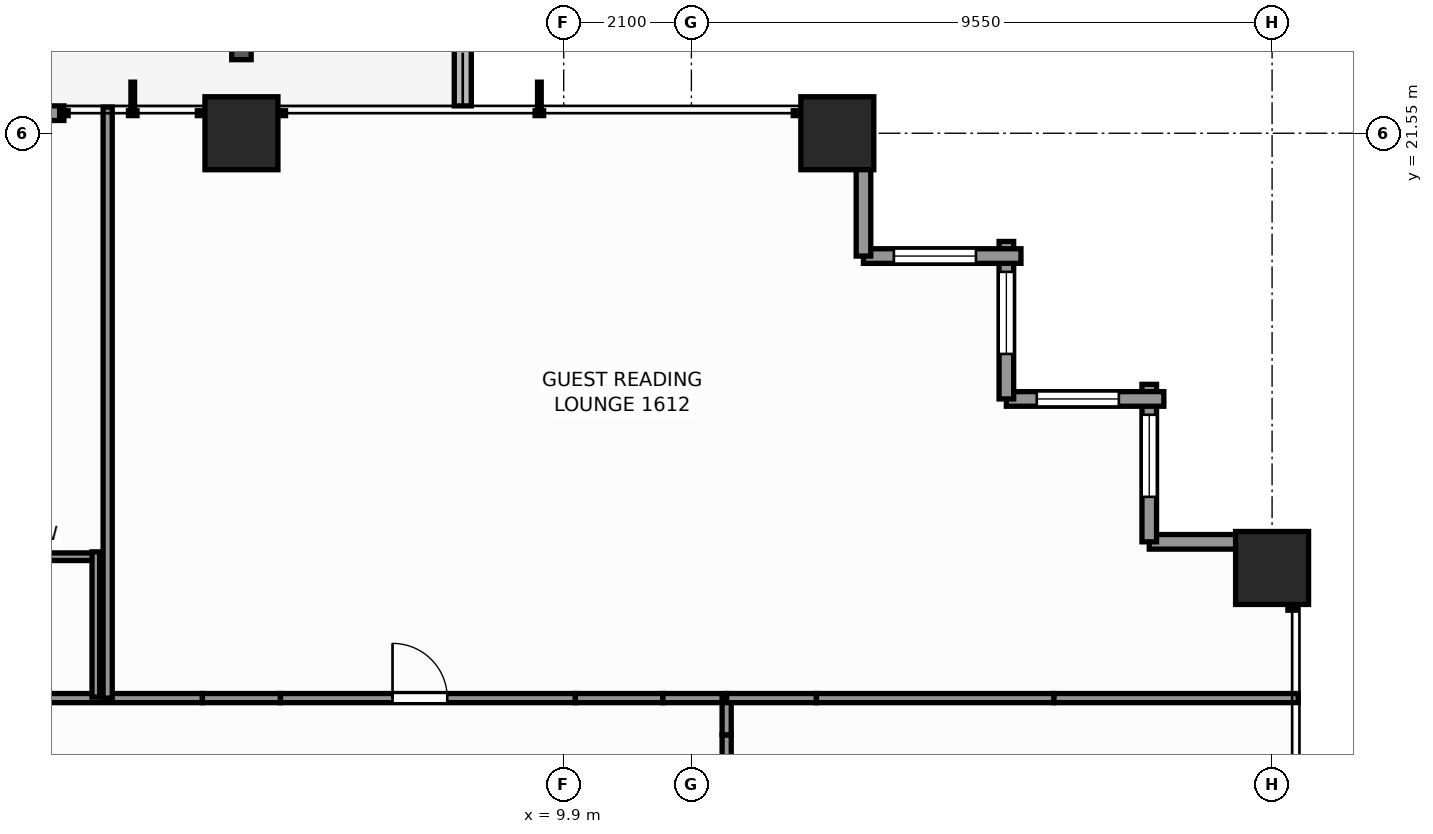
"""IFC4 building model, lengths in metres.
Left out: names, types, materials, properties, quantities, classifications, styles, units other than length and angle.
Written with IfcOpenShell. Run it as: python <this file> out.ifc"""

import sys

from ifc_helpers import new_model, si_unit, direction, frame, frame_2d, origin, origin_2d, place, context, subcontext, project, spatial, rectangle, extrude, element, fill, save


model = new_model("IFC4")
c1 = context("Model", 3, precision=1e-05, world=origin(), true_north=direction((0.0, 1.0)))
c2 = subcontext(c1, "Body", "Model", "MODEL_VIEW")
j1 = project(units=[si_unit("LENGTHUNIT", "METRE"), si_unit("PLANEANGLEUNIT", "RADIAN")], contexts=[c1])
p1 = place(None, origin())
s1 = spatial("IfcSite", under=j1, at=p1, CompositionType="ELEMENT")
p2 = place(p1, origin())
s2 = spatial("IfcBuilding", under=s1, at=p2, CompositionType="ELEMENT")
p3 = place(p2, frame((0.0, 0.0, 56.8)))
s3 = spatial("IfcBuildingStorey", under=s2, at=p3, CompositionType="ELEMENT", Elevation=56.8)
for number, where, z_axis, x_axis in (
    (1, (4.6, 21.55, 0.0), (0.0, 0.0, 1.0), (1.0, 0.0, 0.0)),
    (2, (14.4, 21.55, 0.0), (0.0, 0.0, 1.0), (1.0, 0.0, 0.0)),
    (3, (21.55, 14.4, 0.0), (0.0, 0.0, 1.0), (1.0, 0.0, 0.0)),
):
    element("IfcColumn", number, at=place(p3, frame(where, z_axis=z_axis, x_axis=x_axis)), inside=s3, PredefinedType="COLUMN", context=c2, shape_type="SweptSolid", body=[
        extrude(rectangle(XDim=1.2, YDim=1.2, at=origin_2d()), origin(), (0.0, 0.0, 1.0), 3.3),
    ])
p4 = place(p3, frame((8.24, 22.0, -0.06), z_axis=(0.0, 0.0, 1.0), x_axis=(0.0, 1.0, 0.0)))
e4 = element("IfcWall", 4, at=p4, inside=s3, PredefinedType="PARAPET", context=c2, shape_type="SweptSolid", body=[
    extrude(rectangle(XDim=2.34, YDim=0.28, at=frame_2d((1.17, 0.0))), origin(), (0.0, 0.0, 1.0), 0.42),
])
p5 = place(p3, frame((19.53, 14.83, 0.0), z_axis=(0.0, 0.0, 1.0), x_axis=(1.0, 0.0, 0.0)))
e5 = element("IfcWall", 5, at=p5, inside=s3, PredefinedType="STANDARD", context=c2, shape_type="SweptSolid", body=[
    extrude(rectangle(XDim=2.59, YDim=0.24, at=frame_2d((1.295, 0.0))), origin(), (0.0, 0.0, 1.0), 1.255),
])
p6 = place(p3, frame((19.53, 17.42, 0.0), z_axis=(0.0, 0.0, 1.0), x_axis=(0.0, -1.0, 0.0)))
e6 = element("IfcWall", 6, at=p6, inside=s3, PredefinedType="STANDARD", context=c2, shape_type="SweptSolid", body=[
    extrude(rectangle(XDim=2.59, YDim=0.24, at=frame_2d((1.295, 0.0))), origin(), (0.0, 0.0, 1.0), 2.439),
])
p7 = place(p6, frame((0.5, 0.0, 0.65)))
e7 = element("IfcOpeningElement", 7, at=p7, cuts=e6, PredefinedType="OPENING", context=c2, shape_type="SweptSolid", body=[
    extrude(rectangle(XDim=1.35, YDim=1.55, at=frame_2d((0.675, 0.775))), frame((0.0, 0.13, 0.0), z_axis=(0.0, -1.0, 0.0), x_axis=(1.0, 0.0, 0.0)), (0.0, 0.0, 1.0), 0.26),
])
p8 = place(p3, frame((17.18, 17.18, 0.0), z_axis=(0.0, 0.0, 1.0), x_axis=(1.0, 0.0, 0.0)))
e8 = element("IfcWall", 8, at=p8, inside=s3, PredefinedType="STANDARD", context=c2, shape_type="SweptSolid", body=[
    extrude(rectangle(XDim=2.59, YDim=0.24, at=frame_2d((1.295, 0.0))), origin(), (0.0, 0.0, 1.0), 2.439),
])
p9 = place(p8, frame((0.5, 0.0, 0.65)))
e9 = element("IfcOpeningElement", 9, at=p9, cuts=e8, PredefinedType="OPENING", context=c2, shape_type="SweptSolid", body=[
    extrude(rectangle(XDim=1.35, YDim=1.55, at=frame_2d((0.675, 0.775))), frame((0.0, 0.13, 0.0), z_axis=(0.0, -1.0, 0.0), x_axis=(1.0, 0.0, 0.0)), (0.0, 0.0, 1.0), 0.26),
])
p10 = place(p3, frame((17.18, 19.77, 0.0), z_axis=(0.0, 0.0, 1.0), x_axis=(0.0, -1.0, 0.0)))
e10 = element("IfcWall", 10, at=p10, inside=s3, PredefinedType="STANDARD", context=c2, shape_type="SweptSolid", body=[
    extrude(rectangle(XDim=2.59, YDim=0.24, at=frame_2d((1.295, 0.0))), origin(), (0.0, 0.0, 1.0), 2.439),
])
p11 = place(p10, frame((0.5, 0.0, 0.65)))
e11 = element("IfcOpeningElement", 11, at=p11, cuts=e10, PredefinedType="OPENING", context=c2, shape_type="SweptSolid", body=[
    extrude(rectangle(XDim=1.35, YDim=1.55, at=frame_2d((0.675, 0.775))), frame((0.0, 0.13, 0.0), z_axis=(0.0, -1.0, 0.0), x_axis=(1.0, 0.0, 0.0)), (0.0, 0.0, 1.0), 0.26),
])
p12 = place(p3, frame((14.83, 19.53, 0.0), z_axis=(0.0, 0.0, 1.0), x_axis=(1.0, 0.0, 0.0)))
e12 = element("IfcWall", 12, at=p12, inside=s3, PredefinedType="STANDARD", context=c2, shape_type="SweptSolid", body=[
    extrude(rectangle(XDim=2.59, YDim=0.24, at=frame_2d((1.295, 0.0))), origin(), (0.0, 0.0, 1.0), 2.439),
])
p13 = place(p12, frame((0.5, 0.0, 0.65)))
e13 = element("IfcOpeningElement", 13, at=p13, cuts=e12, PredefinedType="OPENING", context=c2, shape_type="SweptSolid", body=[
    extrude(rectangle(XDim=1.35, YDim=1.55, at=frame_2d((0.675, 0.775))), frame((0.0, 0.13, 0.0), z_axis=(0.0, -1.0, 0.0), x_axis=(1.0, 0.0, 0.0)), (0.0, 0.0, 1.0), 0.26),
])
p14 = place(p3, frame((14.83, 22.12, 0.0), z_axis=(0.0, 0.0, 1.0), x_axis=(0.0, -1.0, 0.0)))
e14 = element("IfcWall", 14, at=p14, inside=s3, PredefinedType="STANDARD", context=c2, shape_type="SweptSolid", body=[
    extrude(rectangle(XDim=2.59, YDim=0.24, at=frame_2d((1.295, 0.0))), origin(), (0.0, 0.0, 1.0), 1.255),
])
p15 = place(p3, frame((-1.68, 21.88, 0.0), z_axis=(0.0, 0.0, 1.0), x_axis=(1.0, 0.0, 0.0)))
e15 = element("IfcWall", 15, at=p15, inside=s3, PredefinedType="STANDARD", context=c2, shape_type="SweptSolid", body=[
    extrude(rectangle(XDim=3.36, YDim=0.24, at=frame_2d((1.68, 0.0))), origin(), (0.0, 0.0, 1.0), 3.06),
])
p16 = place(p15, frame((0.78, 0.0, 0.0)))
e16 = element("IfcOpeningElement", 16, at=p16, cuts=e15, PredefinedType="OPENING", context=c2, shape_type="SweptSolid", body=[
    extrude(rectangle(XDim=1.8, YDim=2.2, at=frame_2d((0.9, 1.1))), frame((0.0, 0.13, 0.0), z_axis=(0.0, -1.0, 0.0), x_axis=(1.0, 0.0, 0.0)), (0.0, 0.0, 1.0), 0.26),
])
p17 = place(p3, frame((-3.958, 12.26, 0.0), z_axis=(0.0, 0.0, 1.0), x_axis=(1.0, 0.0, 0.0)))
e17 = element("IfcWall", 17, at=p17, inside=s3, PredefinedType="PARTITIONING", context=c2, shape_type="SweptSolid", body=[
    extrude(rectangle(XDim=7.916, YDim=0.15, at=frame_2d((3.958, 0.0))), origin(), (0.0, 0.0, 1.0), 2.585),
])
p18 = place(p17, frame((1.186, 0.0, 0.0)))
e18 = element("IfcOpeningElement", 18, at=p18, cuts=e17, PredefinedType="OPENING", context=c2, shape_type="SweptSolid", body=[
    extrude(rectangle(XDim=0.95, YDim=2.06, at=frame_2d((0.475, 1.03))), frame((0.0, 0.085, 0.0), z_axis=(0.0, -1.0, 0.0), x_axis=(1.0, 0.0, 0.0)), (0.0, 0.0, 1.0), 0.17),
])
p19 = place(p3, frame((3.958, 12.26, 0.0), z_axis=(0.0, 0.0, 1.0), x_axis=(1.0, 0.0, 0.0)))
e19 = element("IfcWall", 19, at=p19, inside=s3, PredefinedType="PARTITIONING", context=c2, shape_type="SweptSolid", body=[
    extrude(rectangle(XDim=1.284, YDim=0.15, at=frame_2d((0.642, 0.0))), origin(), (0.0, 0.0, 1.0), 1.245),
])
p20 = place(p3, frame((5.242, 12.26, 0.0), z_axis=(0.0, 0.0, 1.0), x_axis=(1.0, 0.0, 0.0)))
e20 = element("IfcWall", 20, at=p20, inside=s3, PredefinedType="PARTITIONING", context=c2, shape_type="SweptSolid", body=[
    extrude(rectangle(XDim=4.85, YDim=0.15, at=frame_2d((2.425, 0.0))), origin(), (0.0, 0.0, 1.0), 3.06),
])
p21 = place(p20, frame((1.843, 0.0, 0.0)))
e21 = element("IfcOpeningElement", 21, at=p21, cuts=e20, PredefinedType="OPENING", context=c2, shape_type="SweptSolid", body=[
    extrude(rectangle(XDim=0.9, YDim=2.06, at=frame_2d((0.45, 1.03))), frame((0.0, 0.085, 0.0), z_axis=(0.0, -1.0, 0.0), x_axis=(1.0, 0.0, 0.0)), (0.0, 0.0, 1.0), 0.17),
])
p22 = place(p3, frame((10.092, 12.26, 0.0), z_axis=(0.0, 0.0, 1.0), x_axis=(1.0, 0.0, 0.0)))
e22 = element("IfcWall", 22, at=p22, inside=s3, PredefinedType="PARTITIONING", context=c2, shape_type="SweptSolid", body=[
    extrude(rectangle(XDim=1.439, YDim=0.15, at=frame_2d((0.72, 0.0))), origin(), (0.0, 0.0, 1.0), 1.245),
])
p23 = place(p3, frame((11.531, 12.26, 0.0), z_axis=(0.0, 0.0, 1.0), x_axis=(1.0, 0.0, 0.0)))
e23 = element("IfcWall", 23, at=p23, inside=s3, PredefinedType="PARTITIONING", context=c2, shape_type="SweptSolid", body=[
    extrude(rectangle(XDim=1.049, YDim=0.15, at=frame_2d((0.524, 0.0))), origin(), (0.0, 0.0, 1.0), 3.06),
])
p24 = place(p3, frame((12.58, 10.216, 0.0), z_axis=(0.0, 0.0, 1.0), x_axis=(0.0, 1.0, 0.0)))
e24 = element("IfcWall", 24, at=p24, inside=s3, PredefinedType="PARTITIONING", context=c2, shape_type="SweptSolid", body=[
    extrude(rectangle(XDim=1.439, YDim=0.15, at=frame_2d((0.72, 0.0))), origin(), (0.0, 0.0, 1.0), 1.245),
])
p25 = place(p3, frame((12.58, 11.655, 0.0), z_axis=(0.0, 0.0, 1.0), x_axis=(0.0, 1.0, 0.0)))
e25 = element("IfcWall", 25, at=p25, inside=s3, PredefinedType="PARTITIONING", context=c2, shape_type="SweptSolid", body=[
    extrude(rectangle(XDim=0.605, YDim=0.15, at=frame_2d((0.303, 0.0))), origin(), (0.0, 0.0, 1.0), 3.06),
])
p26 = place(p3, frame((12.58, 12.26, 0.0), z_axis=(0.0, 0.0, 1.0), x_axis=(1.0, 0.0, 0.0)))
e26 = element("IfcWall", 26, at=p26, inside=s3, PredefinedType="PARTITIONING", context=c2, shape_type="SweptSolid", body=[
    extrude(rectangle(XDim=1.476, YDim=0.15, at=frame_2d((0.738, 0.0))), origin(), (0.0, 0.0, 1.0), 3.06),
])
p27 = place(p3, frame((14.056, 12.26, 0.0), z_axis=(0.0, 0.0, 1.0), x_axis=(1.0, 0.0, 0.0)))
e27 = element("IfcWall", 27, at=p27, inside=s3, PredefinedType="PARTITIONING", context=c2, shape_type="SweptSolid", body=[
    extrude(rectangle(XDim=3.907, YDim=0.15, at=frame_2d((1.954, 0.0))), origin(), (0.0, 0.0, 1.0), 1.245),
])
p28 = place(p3, frame((17.963, 12.26, 0.0), z_axis=(0.0, 0.0, 1.0), x_axis=(1.0, 0.0, 0.0)))
e28 = element("IfcWall", 28, at=p28, inside=s3, PredefinedType="PARTITIONING", context=c2, shape_type="SweptSolid", body=[
    extrude(rectangle(XDim=4.017, YDim=0.15, at=frame_2d((2.008, 0.0))), origin(), (0.0, 0.0, 1.0), 2.429),
])
p29 = place(p3, frame((2.4, 12.26, 0.0), z_axis=(0.0, 0.0, 1.0), x_axis=(0.0, 1.0, 0.0)))
e29 = element("IfcWall", 29, at=p29, inside=s3, PredefinedType="PARTITIONING", context=c2, shape_type="SweptSolid", body=[
    extrude(rectangle(XDim=9.72, YDim=0.15, at=frame_2d((4.86, 0.0))), origin(), (0.0, 0.0, 1.0), 2.429),
])
p30 = place(p3, frame((-0.505, 14.585, 0.0), z_axis=(0.0, 0.0, 1.0), x_axis=(1.0, 0.0, 0.0)))
e30 = element("IfcWall", 30, at=p30, inside=s3, PredefinedType="PARTITIONING", context=c2, shape_type="SweptSolid", body=[
    extrude(rectangle(XDim=2.77, YDim=0.125, at=frame_2d((1.385, 0.0))), origin(), (0.0, 0.0, 1.0), 2.585),
])
p31 = place(p3, frame((2.205, 12.275, 0.0), z_axis=(0.0, 0.0, 1.0), x_axis=(0.0, 1.0, 0.0)))
e31 = element("IfcWall", 31, at=p31, inside=s3, PredefinedType="PARTITIONING", context=c2, shape_type="SweptSolid", body=[
    extrude(rectangle(XDim=2.39, YDim=0.125, at=frame_2d((1.195, 0.0))), origin(), (0.0, 0.0, 1.0), 3.06),
])
p32 = place(p7, origin())
e32 = element("IfcWindow", 32, at=p32, inside=s3, PartitioningType="SINGLE_PANEL", PredefinedType="WINDOW", context=c2, shape_type="SweptSolid", body=[
    extrude(rectangle(XDim=1.35, YDim=1.55, at=frame_2d((0.675, 0.775))), frame((0.0, 0.03, 0.0), z_axis=(0.0, -1.0, 0.0), x_axis=(1.0, 0.0, 0.0)), (0.0, 0.0, 1.0), 0.06),
])
fill(e7, e32)
p33 = place(p9, origin())
e33 = element("IfcWindow", 33, at=p33, inside=s3, PartitioningType="SINGLE_PANEL", PredefinedType="WINDOW", context=c2, shape_type="SweptSolid", body=[
    extrude(rectangle(XDim=1.35, YDim=1.55, at=frame_2d((0.675, 0.775))), frame((0.0, 0.03, 0.0), z_axis=(0.0, -1.0, 0.0), x_axis=(1.0, 0.0, 0.0)), (0.0, 0.0, 1.0), 0.06),
])
fill(e9, e33)
p34 = place(p11, origin())
e34 = element("IfcWindow", 34, at=p34, inside=s3, PartitioningType="SINGLE_PANEL", PredefinedType="WINDOW", context=c2, shape_type="SweptSolid", body=[
    extrude(rectangle(XDim=1.35, YDim=1.55, at=frame_2d((0.675, 0.775))), frame((0.0, 0.03, 0.0), z_axis=(0.0, -1.0, 0.0), x_axis=(1.0, 0.0, 0.0)), (0.0, 0.0, 1.0), 0.06),
])
fill(e11, e34)
p35 = place(p13, origin())
e35 = element("IfcWindow", 35, at=p35, inside=s3, PartitioningType="SINGLE_PANEL", PredefinedType="WINDOW", context=c2, shape_type="SweptSolid", body=[
    extrude(rectangle(XDim=1.35, YDim=1.55, at=frame_2d((0.675, 0.775))), frame((0.0, 0.03, 0.0), z_axis=(0.0, -1.0, 0.0), x_axis=(1.0, 0.0, 0.0)), (0.0, 0.0, 1.0), 0.06),
])
fill(e13, e35)
p36 = place(p21, origin())
e36 = element("IfcDoor", 36, at=p36, inside=s3, OperationType="SINGLE_SWING_LEFT", PredefinedType="DOOR", context=c2, shape_type="SweptSolid", body=[
    extrude(rectangle(XDim=0.9, YDim=2.06, at=frame_2d((0.45, 1.03))), frame((0.0, 0.025, 0.0), z_axis=(0.0, -1.0, 0.0), x_axis=(1.0, 0.0, 0.0)), (0.0, 0.0, 1.0), 0.05),
])
fill(e21, e36)
save(model, sys.argv[1])
